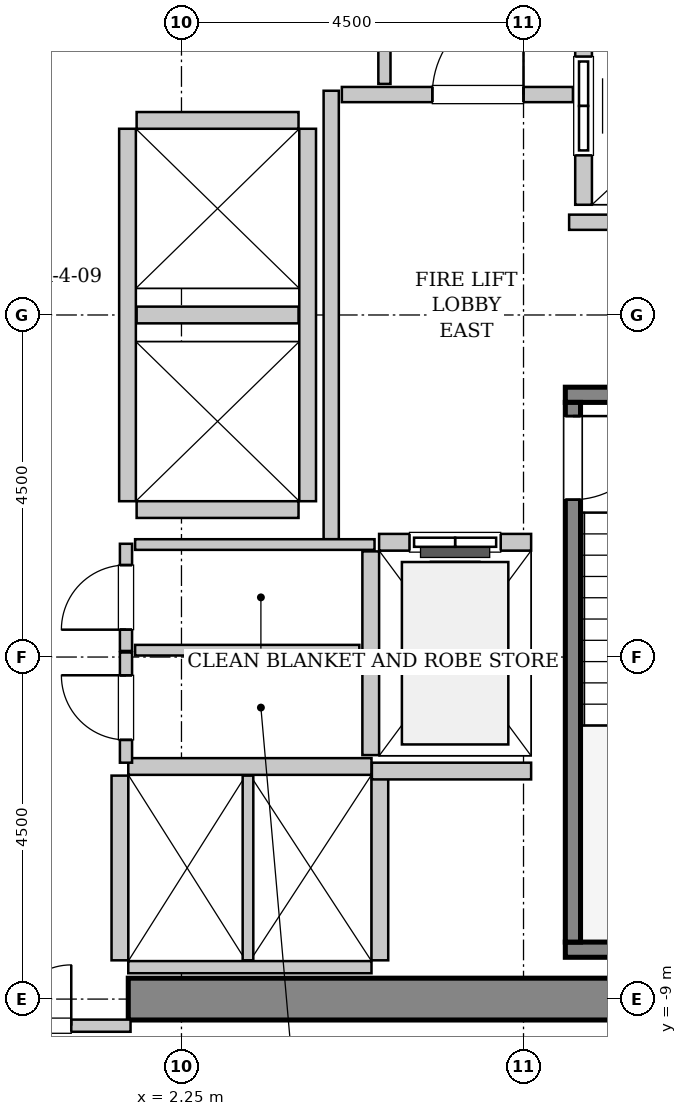
"""IFC4 building model, lengths in metres.
Left out: names, types, materials, properties, quantities, classifications, styles, units other than length and angle.
Written with IfcOpenShell. Run it as: python <this file> out.ifc"""

import sys

from ifc_helpers import new_model, si_unit, direction, frame, frame_2d, origin, place, context, subcontext, project, spatial, rectangle, extrude, source, transform, mapped, element, fill, save


model = new_model("IFC4")
c1 = context("Model", 3, precision=1e-05, world=origin(), true_north=direction((0.0, 1.0)))
c2 = subcontext(c1, "Body", "Model", "MODEL_VIEW")
j1 = project(units=[si_unit("LENGTHUNIT", "METRE"), si_unit("PLANEANGLEUNIT", "RADIAN")], contexts=[c1])
p1 = place(None, origin())
s1 = spatial("IfcSite", under=j1, at=p1, CompositionType="ELEMENT")
p2 = place(p1, origin())
s2 = spatial("IfcBuilding", under=s1, at=p2, CompositionType="ELEMENT")
p3 = place(p2, frame((0.0, 0.0, 125.0)))
s3 = spatial("IfcBuildingStorey", under=s2, at=p3, CompositionType="ELEMENT", Elevation=125.0)
m1 = source(origin(), c2, "Body", "SweptSolid", [
    extrude(rectangle(XDim=9.975, YDim=0.55, at=frame_2d((4.987, 0.0))), origin(), (0.0, 0.0, 1.0), 3.8),
])
p4 = place(p3, frame((1.55, -9.0, 0.0), z_axis=(0.0, 0.0, 1.0), x_axis=(1.0, 0.0, 0.0)))
e1 = element("IfcWall", 1, at=p4, inside=s3, PredefinedType="SHEAR", context=c2, shape_type="MappedRepresentation", body=[
    mapped(m1, transform((0.0, 0.0, 0.0), x_axis=(1.0, 0.0, 0.0), y_axis=(0.0, 1.0, 0.0), z_axis=(0.0, 0.0, 1.0), scale=1.0)),
])
m2 = source(origin(), c2, "Body", "SweptSolid", [
    extrude(rectangle(XDim=3.4, YDim=0.2, at=frame_2d((1.7, 0.0))), origin(), (0.0, 0.0, 1.0), 3.8),
])
p5 = place(p3, frame((7.3, -1.05, 0.0), z_axis=(0.0, 0.0, 1.0), x_axis=(1.0, 0.0, 0.0)))
e2 = element("IfcWall", 2, at=p5, inside=s3, PredefinedType="SOLIDWALL", context=c2, shape_type="MappedRepresentation", body=[
    mapped(m2, transform((0.0, 0.0, 0.0), x_axis=(1.0, 0.0, 0.0), y_axis=(0.0, 1.0, 0.0), z_axis=(0.0, 0.0, 1.0), scale=1.0)),
])
m3 = source(origin(), c2, "Body", "SweptSolid", [
    extrude(rectangle(XDim=3.68, YDim=0.2, at=frame_2d((1.84, 0.0))), origin(), (0.0, 0.0, 1.0), 3.8),
])
p6 = place(p3, frame((7.3, -8.35, 0.0), z_axis=(0.0, 0.0, 1.0), x_axis=(1.0, 0.0, 0.0)))
e3 = element("IfcWall", 3, at=p6, inside=s3, PredefinedType="SOLIDWALL", context=c2, shape_type="MappedRepresentation", body=[
    mapped(m3, transform((0.0, 0.0, 0.0), x_axis=(1.0, 0.0, 0.0), y_axis=(0.0, 1.0, 0.0), z_axis=(0.0, 0.0, 1.0), scale=1.0)),
])
m4 = source(origin(), c2, "Body", "SweptSolid", [
    extrude(rectangle(XDim=7.1, YDim=0.2, at=frame_2d((3.55, 0.0))), origin(), (0.0, 0.0, 1.0), 3.8),
])
p7 = place(p3, frame((7.4, -1.15, 0.0), z_axis=(0.0, 0.0, 1.0), x_axis=(0.0, -1.0, 0.0)))
e4 = element("IfcWall", 4, at=p7, inside=s3, PredefinedType="SOLIDWALL", context=c2, shape_type="MappedRepresentation", body=[
    mapped(m4, transform((0.0, 0.0, 0.0), x_axis=(1.0, 0.0, 0.0), y_axis=(0.0, 1.0, 0.0), z_axis=(0.0, 0.0, 1.0), scale=1.0)),
])
p8 = place(p7, frame((0.18, 0.0, 0.0)))
e5 = element("IfcOpeningElement", 5, at=p8, cuts=e4, PredefinedType="OPENING", context=c2, shape_type="SweptSolid", body=[
    extrude(rectangle(XDim=1.1, YDim=2.15, at=frame_2d((0.55, 1.075))), frame((0.0, 0.11, 0.0), z_axis=(0.0, -1.0, 0.0), x_axis=(1.0, 0.0, 0.0)), (0.0, 0.0, 1.0), 0.22),
])
m5 = source(origin(), c2, "Body", "SweptSolid", [
    extrude(rectangle(XDim=2.0, YDim=0.22, at=frame_2d((1.0, 0.0))), origin(), (0.0, 0.0, 1.0), 3.535),
])
p9 = place(p3, frame((6.85, -2.99, 0.0), z_axis=(0.0, 0.0, 1.0), x_axis=(-1.0, 0.0, 0.0)))
e6 = element("IfcWall", 6, at=p9, inside=s3, PredefinedType="SOLIDWALL", context=c2, shape_type="MappedRepresentation", body=[
    mapped(m5, transform((0.0, 0.0, 0.0), x_axis=(1.0, 0.0, 0.0), y_axis=(0.0, 1.0, 0.0), z_axis=(0.0, 0.0, 1.0), scale=1.0)),
])
p10 = place(p9, frame((0.4, 0.0, 0.0)))
e7 = element("IfcOpeningElement", 7, at=p10, cuts=e6, PredefinedType="OPENING", context=c2, shape_type="SweptSolid", body=[
    extrude(rectangle(XDim=1.2, YDim=2.2, at=frame_2d((0.6, 1.1))), frame((0.0, 0.12, 0.0), z_axis=(0.0, -1.0, 0.0), x_axis=(1.0, 0.0, 0.0)), (0.0, 0.0, 1.0), 0.24),
])
m6 = source(origin(), c2, "Body", "SweptSolid", [
    extrude(rectangle(XDim=2.68, YDim=0.22, at=frame_2d((1.34, 0.0))), origin(), (0.0, 0.0, 1.0), 3.535),
])
p11 = place(p3, frame((4.74, -3.11, 0.0), z_axis=(0.0, 0.0, 1.0), x_axis=(0.0, -1.0, 0.0)))
e8 = element("IfcWall", 8, at=p11, inside=s3, PredefinedType="SOLIDWALL", context=c2, shape_type="MappedRepresentation", body=[
    mapped(m6, transform((0.0, 0.0, 0.0), x_axis=(1.0, 0.0, 0.0), y_axis=(0.0, 1.0, 0.0), z_axis=(0.0, 0.0, 1.0), scale=1.0)),
])
m7 = source(origin(), c2, "Body", "SweptSolid", [
    extrude(rectangle(XDim=5.45, YDim=0.22, at=frame_2d((2.725, 0.0))), origin(), (0.0, 0.0, 1.0), 3.535),
])
p12 = place(p3, frame((7.54, 6.9, 0.0), z_axis=(0.0, 0.0, 1.0), x_axis=(0.0, -1.0, 0.0)))
e9 = element("IfcWall", 9, at=p12, inside=s3, PredefinedType="SOLIDWALL", context=c2, shape_type="MappedRepresentation", body=[
    mapped(m7, transform((0.0, 0.0, 0.0), x_axis=(1.0, 0.0, 0.0), y_axis=(0.0, 1.0, 0.0), z_axis=(0.0, 0.0, 1.0), scale=1.0)),
])
p13 = place(p12, frame((3.5, 0.0, 0.0)))
e10 = element("IfcOpeningElement", 10, at=p13, cuts=e9, PredefinedType="OPENING", context=c2, shape_type="SweptSolid", body=[
    extrude(rectangle(XDim=1.3, YDim=2.3, at=frame_2d((0.65, 1.15))), frame((0.0, 0.12, 0.0), z_axis=(0.0, -1.0, 0.0), x_axis=(1.0, 0.0, 0.0)), (0.0, 0.0, 1.0), 0.24),
])
p14 = place(p12, frame((0.65, 0.0, 0.0)))
e11 = element("IfcOpeningElement", 11, at=p14, cuts=e9, PredefinedType="OPENING", context=c2, shape_type="SweptSolid", body=[
    extrude(rectangle(XDim=1.3, YDim=2.3, at=frame_2d((0.65, 1.15))), frame((0.0, 0.12, 0.0), z_axis=(0.0, -1.0, 0.0), x_axis=(1.0, 0.0, 0.0)), (0.0, 0.0, 1.0), 0.24),
])
m8 = source(origin(), c2, "Body", "SweptSolid", [
    extrude(rectangle(XDim=3.2, YDim=0.22, at=frame_2d((1.6, 0.0))), origin(), (0.0, 0.0, 1.0), 3.535),
])
p15 = place(p3, frame((4.75, -5.94, 0.0), z_axis=(0.0, 0.0, 1.0), x_axis=(-1.0, 0.0, 0.0)))
e12 = element("IfcWall", 12, at=p15, inside=s3, PredefinedType="SOLIDWALL", context=c2, shape_type="MappedRepresentation", body=[
    mapped(m8, transform((0.0, 0.0, 0.0), x_axis=(1.0, 0.0, 0.0), y_axis=(0.0, 1.0, 0.0), z_axis=(0.0, 0.0, 1.0), scale=1.0)),
])
m9 = source(origin(), c2, "Body", "SweptSolid", [
    extrude(rectangle(XDim=3.2, YDim=0.16, at=frame_2d((1.6, 0.0))), origin(), (0.0, 0.0, 1.0), 2.425),
])
p16 = place(p3, frame((1.55, -8.58, 0.0), z_axis=(0.0, 0.0, 1.0), x_axis=(1.0, 0.0, 0.0)))
e13 = element("IfcWall", 13, at=p16, inside=s3, PredefinedType="PARTITIONING", context=c2, shape_type="MappedRepresentation", body=[
    mapped(m9, transform((0.0, 0.0, 0.0), x_axis=(1.0, 0.0, 0.0), y_axis=(0.0, 1.0, 0.0), z_axis=(0.0, 0.0, 1.0), scale=1.0)),
])
m10 = source(origin(), c2, "Body", "SweptSolid", [
    extrude(rectangle(XDim=2.43, YDim=0.22, at=frame_2d((1.215, 0.0))), origin(), (0.0, 0.0, 1.0), 3.535),
])
p17 = place(p3, frame((1.44, -6.06, 0.0), z_axis=(0.0, 0.0, 1.0), x_axis=(0.0, -1.0, 0.0)))
e14 = element("IfcWall", 14, at=p17, inside=s3, PredefinedType="SOLIDWALL", context=c2, shape_type="MappedRepresentation", body=[
    mapped(m10, transform((0.0, 0.0, 0.0), x_axis=(1.0, 0.0, 0.0), y_axis=(0.0, 1.0, 0.0), z_axis=(0.0, 0.0, 1.0), scale=1.0)),
])
m11 = source(origin(), c2, "Body", "SweptSolid", [
    extrude(rectangle(XDim=2.43, YDim=0.14, at=frame_2d((1.215, 0.0))), origin(), (0.0, 0.0, 1.0), 3.535),
])
p18 = place(p3, frame((3.125, -8.49, 0.0), z_axis=(0.0, 0.0, 1.0), x_axis=(0.0, 1.0, 0.0)))
e15 = element("IfcWall", 15, at=p18, inside=s3, PredefinedType="PARTITIONING", context=c2, shape_type="MappedRepresentation", body=[
    mapped(m11, transform((0.0, 0.0, 0.0), x_axis=(1.0, 0.0, 0.0), y_axis=(0.0, 1.0, 0.0), z_axis=(0.0, 0.0, 1.0), scale=1.0)),
])
p19 = place(p3, frame((4.86, -8.49, 0.0), z_axis=(0.0, 0.0, 1.0), x_axis=(0.0, 1.0, 0.0)))
e16 = element("IfcWall", 16, at=p19, inside=s3, PredefinedType="SOLIDWALL", context=c2, shape_type="MappedRepresentation", body=[
    mapped(m10, transform((0.0, 0.0, 0.0), x_axis=(1.0, 0.0, 0.0), y_axis=(0.0, 1.0, 0.0), z_axis=(0.0, 0.0, 1.0), scale=1.0)),
])
m12 = source(origin(), c2, "Body", "SweptSolid", [
    extrude(rectangle(XDim=4.9, YDim=0.22, at=frame_2d((2.45, 0.0))), origin(), (0.0, 0.0, 1.0), 3.535),
])
for number, where, z_axis, x_axis in (
    (17, (1.54, 2.45, 0.0), (0.0, 0.0, 1.0), (0.0, -1.0, 0.0)),
    (18, (3.91, -2.45, 0.0), (0.0, 0.0, 1.0), (0.0, 1.0, 0.0)),
):
    element("IfcWall", number, at=place(p3, frame(where, z_axis=z_axis, x_axis=x_axis)), inside=s3, PredefinedType="SOLIDWALL", context=c2, shape_type="MappedRepresentation", body=[
        mapped(m12, transform((0.0, 0.0, 0.0), x_axis=(1.0, 0.0, 0.0), y_axis=(0.0, 1.0, 0.0), z_axis=(0.0, 0.0, 1.0), scale=1.0)),
    ])
m13 = source(origin(), c2, "Body", "SweptSolid", [
    extrude(rectangle(XDim=2.13, YDim=0.22, at=frame_2d((1.065, 0.0))), origin(), (0.0, 0.0, 1.0), 3.535),
])
for number, where, z_axis, x_axis in (
    (19, (1.66, -2.56, 0.0), (0.0, 0.0, 1.0), (1.0, 0.0, 0.0)),
    (20, (1.66, 0.0, 0.0), (0.0, 0.0, 1.0), (1.0, 0.0, 0.0)),
    (21, (3.79, 2.56, 0.0), (0.0, 0.0, 1.0), (-1.0, 0.0, 0.0)),
):
    element("IfcWall", number, at=place(p3, frame(where, z_axis=z_axis, x_axis=x_axis)), inside=s3, PredefinedType="SOLIDWALL", context=c2, shape_type="MappedRepresentation", body=[
        mapped(m13, transform((0.0, 0.0, 0.0), x_axis=(1.0, 0.0, 0.0), y_axis=(0.0, 1.0, 0.0), z_axis=(0.0, 0.0, 1.0), scale=1.0)),
    ])
m14 = source(origin(), c2, "Body", "SweptSolid", [
    extrude(rectangle(XDim=2.095, YDim=0.22, at=frame_2d((1.048, 0.0))), origin(), (0.0, 0.0, 1.0), 3.535),
])
p20 = place(p3, frame((4.755, -6.0, 0.0), z_axis=(0.0, 0.0, 1.0), x_axis=(1.0, 0.0, 0.0)))
e22 = element("IfcWall", 22, at=p20, inside=s3, PredefinedType="SOLIDWALL", context=c2, shape_type="MappedRepresentation", body=[
    mapped(m14, transform((0.0, 0.0, 0.0), x_axis=(1.0, 0.0, 0.0), y_axis=(0.0, 1.0, 0.0), z_axis=(0.0, 0.0, 1.0), scale=1.0)),
])
m15 = source(origin(), c2, "Body", "SweptSolid", [
    extrude(rectangle(XDim=5.9, YDim=0.2, at=frame_2d((2.95, 0.0))), origin(), (0.0, 0.0, 1.0), 3.535),
])
p21 = place(p3, frame((4.22, -2.95, 0.0), z_axis=(0.0, 0.0, 1.0), x_axis=(0.0, 1.0, 0.0)))
e23 = element("IfcWall", 23, at=p21, inside=s3, PredefinedType="PARTITIONING", context=c2, shape_type="MappedRepresentation", body=[
    mapped(m15, transform((0.0, 0.0, 0.0), x_axis=(1.0, 0.0, 0.0), y_axis=(0.0, 1.0, 0.0), z_axis=(0.0, 0.0, 1.0), scale=1.0)),
])
m16 = source(origin(), c2, "Body", "SweptSolid", [
    extrude(rectangle(XDim=3.04, YDim=0.2, at=frame_2d((1.52, 0.0))), origin(), (0.0, 0.0, 1.0), 3.535),
])
p22 = place(p3, frame((4.36, 2.9, 0.0), z_axis=(0.0, 0.0, 1.0), x_axis=(1.0, 0.0, 0.0)))
e24 = element("IfcWall", 24, at=p22, inside=s3, PredefinedType="PARTITIONING", context=c2, shape_type="MappedRepresentation", body=[
    mapped(m16, transform((0.0, 0.0, 0.0), x_axis=(1.0, 0.0, 0.0), y_axis=(0.0, 1.0, 0.0), z_axis=(0.0, 0.0, 1.0), scale=1.0)),
])
p23 = place(p22, frame((1.19, 0.0, 0.0)))
e25 = element("IfcOpeningElement", 25, at=p23, cuts=e24, PredefinedType="OPENING", context=c2, shape_type="SweptSolid", body=[
    extrude(rectangle(XDim=1.2, YDim=2.15, at=frame_2d((0.6, 1.075))), frame((0.0, 0.11, 0.0), z_axis=(0.0, -1.0, 0.0), x_axis=(1.0, 0.0, 0.0)), (0.0, 0.0, 1.0), 0.22),
])
m17 = source(origin(), c2, "Body", "SweptSolid", [
    extrude(rectangle(XDim=4.11, YDim=0.2, at=frame_2d((2.055, 0.0))), origin(), (0.0, 0.0, 1.0), 3.535),
])
p24 = place(p3, frame((7.35, 1.22, 0.0), z_axis=(0.0, 0.0, 1.0), x_axis=(1.0, 0.0, 0.0)))
e26 = element("IfcWall", 26, at=p24, inside=s3, PredefinedType="PARTITIONING", context=c2, shape_type="MappedRepresentation", body=[
    mapped(m17, transform((0.0, 0.0, 0.0), x_axis=(1.0, 0.0, 0.0), y_axis=(0.0, 1.0, 0.0), z_axis=(0.0, 0.0, 1.0), scale=1.0)),
])
m18 = source(origin(), c2, "Body", "SweptSolid", [
    extrude(rectangle(XDim=3.16, YDim=0.16, at=frame_2d((1.58, 0.0))), origin(), (0.0, 0.0, 1.0), 2.425),
])
p25 = place(p3, frame((-1.58, -9.35, 0.0), z_axis=(0.0, 0.0, 1.0), x_axis=(1.0, 0.0, 0.0)))
e27 = element("IfcWall", 27, at=p25, inside=s3, PredefinedType="PARTITIONING", context=c2, shape_type="MappedRepresentation", body=[
    mapped(m18, transform((0.0, 0.0, 0.0), x_axis=(1.0, 0.0, 0.0), y_axis=(0.0, 1.0, 0.0), z_axis=(0.0, 0.0, 1.0), scale=1.0)),
])
p26 = place(p25, frame((0.78, 0.0, 0.0)))
e28 = element("IfcOpeningElement", 28, at=p26, cuts=e27, PredefinedType="OPENING", context=c2, shape_type="SweptSolid", body=[
    extrude(rectangle(XDim=1.6, YDim=2.3, at=frame_2d((0.8, 1.15))), frame((0.0, 0.09, 0.0), z_axis=(0.0, -1.0, 0.0), x_axis=(1.0, 0.0, 0.0)), (0.0, 0.0, 1.0), 0.18),
])
m19 = source(origin(), c2, "Body", "SweptSolid", [
    extrude(rectangle(XDim=3.015, YDim=0.16, at=frame_2d((1.507, 0.0))), origin(), (0.0, 0.0, 1.0), 3.535),
])
p27 = place(p3, frame((4.92, 3.04, 0.0), z_axis=(0.0, 0.0, 1.0), x_axis=(0.0, 1.0, 0.0)))
e29 = element("IfcWall", 29, at=p27, inside=s3, PredefinedType="PARTITIONING", context=c2, shape_type="MappedRepresentation", body=[
    mapped(m19, transform((0.0, 0.0, 0.0), x_axis=(1.0, 0.0, 0.0), y_axis=(0.0, 1.0, 0.0), z_axis=(0.0, 0.0, 1.0), scale=1.0)),
])
m20 = source(origin(), c2, "Body", "SweptSolid", [
    extrude(rectangle(XDim=1.41, YDim=0.16, at=frame_2d((0.705, 0.0))), origin(), (0.0, 0.0, 1.0), 3.535),
])
p28 = place(p3, frame((1.52, -4.42, 0.0), z_axis=(0.0, 0.0, 1.0), x_axis=(0.0, 1.0, 0.0)))
e30 = element("IfcWall", 30, at=p28, inside=s3, PredefinedType="PARTITIONING", context=c2, shape_type="MappedRepresentation", body=[
    mapped(m20, transform((0.0, 0.0, 0.0), x_axis=(1.0, 0.0, 0.0), y_axis=(0.0, 1.0, 0.0), z_axis=(0.0, 0.0, 1.0), scale=1.0)),
])
p29 = place(p28, frame((0.28, 0.0, 0.0)))
e31 = element("IfcOpeningElement", 31, at=p29, cuts=e30, PredefinedType="OPENING", context=c2, shape_type="SweptSolid", body=[
    extrude(rectangle(XDim=0.85, YDim=2.1, at=frame_2d((0.425, 1.05))), frame((0.0, 0.09, 0.0), z_axis=(0.0, -1.0, 0.0), x_axis=(1.0, 0.0, 0.0)), (0.0, 0.0, 1.0), 0.18),
])
m21 = source(origin(), c2, "Body", "SweptSolid", [
    extrude(rectangle(XDim=3.15, YDim=0.14, at=frame_2d((1.575, 0.0))), origin(), (0.0, 0.0, 1.0), 3.535),
])
p30 = place(p3, frame((1.64, -3.02, 0.0), z_axis=(0.0, 0.0, 1.0), x_axis=(1.0, 0.0, 0.0)))
e32 = element("IfcWall", 32, at=p30, inside=s3, PredefinedType="PARTITIONING", context=c2, shape_type="MappedRepresentation", body=[
    mapped(m21, transform((0.0, 0.0, 0.0), x_axis=(1.0, 0.0, 0.0), y_axis=(0.0, 1.0, 0.0), z_axis=(0.0, 0.0, 1.0), scale=1.0)),
])
m22 = source(origin(), c2, "Body", "SweptSolid", [
    extrude(rectangle(XDim=2.95, YDim=0.14, at=frame_2d((1.475, 0.0))), origin(), (0.0, 0.0, 1.0), 3.535),
])
p31 = place(p3, frame((1.64, -4.41, 0.0), z_axis=(0.0, 0.0, 1.0), x_axis=(1.0, 0.0, 0.0)))
e33 = element("IfcWall", 33, at=p31, inside=s3, PredefinedType="PARTITIONING", context=c2, shape_type="MappedRepresentation", body=[
    mapped(m22, transform((0.0, 0.0, 0.0), x_axis=(1.0, 0.0, 0.0), y_axis=(0.0, 1.0, 0.0), z_axis=(0.0, 0.0, 1.0), scale=1.0)),
])
m23 = source(origin(), c2, "Body", "SweptSolid", [
    extrude(rectangle(XDim=1.45, YDim=0.16, at=frame_2d((0.725, 0.0))), origin(), (0.0, 0.0, 1.0), 3.535),
])
p32 = place(p3, frame((1.52, -5.89, 0.0), z_axis=(0.0, 0.0, 1.0), x_axis=(0.0, 1.0, 0.0)))
e34 = element("IfcWall", 34, at=p32, inside=s3, PredefinedType="PARTITIONING", context=c2, shape_type="MappedRepresentation", body=[
    mapped(m23, transform((0.0, 0.0, 0.0), x_axis=(1.0, 0.0, 0.0), y_axis=(0.0, 1.0, 0.0), z_axis=(0.0, 0.0, 1.0), scale=1.0)),
])
p33 = place(p32, frame((0.3, 0.0, 0.0)))
e35 = element("IfcOpeningElement", 35, at=p33, cuts=e34, PredefinedType="OPENING", context=c2, shape_type="SweptSolid", body=[
    extrude(rectangle(XDim=0.85, YDim=2.1, at=frame_2d((0.425, 1.05))), frame((0.0, 0.09, 0.0), z_axis=(0.0, -1.0, 0.0), x_axis=(1.0, 0.0, 0.0)), (0.0, 0.0, 1.0), 0.18),
])
m24 = source(origin(), c2, "Body", "SweptSolid", [
    extrude(rectangle(XDim=1.1, YDim=2.15, at=frame_2d((0.55, 1.075))), frame((0.0, 0.025, 0.0), z_axis=(0.0, -1.0, 0.0), x_axis=(1.0, 0.0, 0.0)), (0.0, 0.0, 1.0), 0.05),
])
p34 = place(p8, origin())
e36 = element("IfcDoor", 36, at=p34, inside=s3, OperationType="SINGLE_SWING_LEFT", PredefinedType="DOOR", context=c2, shape_type="MappedRepresentation", body=[
    mapped(m24, transform((0.0, 0.0, 0.0), x_axis=(1.0, 0.0, 0.0), y_axis=(0.0, 1.0, 0.0), z_axis=(0.0, 0.0, 1.0), scale=1.0)),
])
fill(e5, e36)
m25 = source(origin(), c2, "Body", "SweptSolid", [
    extrude(rectangle(XDim=1.2, YDim=2.2, at=frame_2d((0.6, 1.1))), frame((0.0, 0.025, 0.0), z_axis=(0.0, -1.0, 0.0), x_axis=(1.0, 0.0, 0.0)), (0.0, 0.0, 1.0), 0.05),
])
p35 = place(p10, origin())
e37 = element("IfcDoor", 37, at=p35, inside=s3, OperationType="SLIDING_TO_LEFT", PredefinedType="DOOR", context=c2, shape_type="MappedRepresentation", body=[
    mapped(m25, transform((0.0, 0.0, 0.0), x_axis=(1.0, 0.0, 0.0), y_axis=(0.0, 1.0, 0.0), z_axis=(0.0, 0.0, 1.0), scale=1.0)),
])
fill(e7, e37)
m26 = source(origin(), c2, "Body", "SweptSolid", [
    extrude(rectangle(XDim=1.3, YDim=2.3, at=frame_2d((0.65, 1.15))), frame((0.0, 0.025, 0.0), z_axis=(0.0, -1.0, 0.0), x_axis=(1.0, 0.0, 0.0)), (0.0, 0.0, 1.0), 0.05),
])
p36 = place(p13, origin())
e38 = element("IfcDoor", 38, at=p36, inside=s3, OperationType="SLIDING_TO_RIGHT", PredefinedType="DOOR", context=c2, shape_type="MappedRepresentation", body=[
    mapped(m26, transform((0.0, 0.0, 0.0), x_axis=(1.0, 0.0, 0.0), y_axis=(0.0, 1.0, 0.0), z_axis=(0.0, 0.0, 1.0), scale=1.0)),
])
fill(e10, e38)
m27 = source(origin(), c2, "Body", "SweptSolid", [
    extrude(rectangle(XDim=1.2, YDim=2.15, at=frame_2d((0.6, 1.075))), frame((0.0, 0.025, 0.0), z_axis=(0.0, -1.0, 0.0), x_axis=(1.0, 0.0, 0.0)), (0.0, 0.0, 1.0), 0.05),
])
p37 = place(p23, origin())
e39 = element("IfcDoor", 39, at=p37, inside=s3, OperationType="SINGLE_SWING_RIGHT", PredefinedType="DOOR", context=c2, shape_type="MappedRepresentation", body=[
    mapped(m27, transform((0.0, 0.0, 0.0), x_axis=(1.0, 0.0, 0.0), y_axis=(0.0, 1.0, 0.0), z_axis=(0.0, 0.0, 1.0), scale=1.0)),
])
fill(e25, e39)
m28 = source(origin(), c2, "Body", "SweptSolid", [
    extrude(rectangle(XDim=1.6, YDim=2.3, at=frame_2d((0.8, 1.15))), frame((0.0, 0.025, 0.0), z_axis=(0.0, -1.0, 0.0), x_axis=(1.0, 0.0, 0.0)), (0.0, 0.0, 1.0), 0.05),
])
p38 = place(p26, origin())
e40 = element("IfcDoor", 40, at=p38, inside=s3, OperationType="DOUBLE_DOOR_SINGLE_SWING", PredefinedType="DOOR", context=c2, shape_type="MappedRepresentation", body=[
    mapped(m28, transform((0.0, 0.0, 0.0), x_axis=(1.0, 0.0, 0.0), y_axis=(0.0, 1.0, 0.0), z_axis=(0.0, 0.0, 1.0), scale=1.0)),
])
fill(e28, e40)
m29 = source(origin(), c2, "Body", "SweptSolid", [
    extrude(rectangle(XDim=0.85, YDim=2.1, at=frame_2d((0.425, 1.05))), frame((0.0, 0.025, 0.0), z_axis=(0.0, -1.0, 0.0), x_axis=(1.0, 0.0, 0.0)), (0.0, 0.0, 1.0), 0.05),
])
p39 = place(p29, origin())
e41 = element("IfcDoor", 41, at=p39, inside=s3, OperationType="SINGLE_SWING_LEFT", PredefinedType="DOOR", context=c2, shape_type="MappedRepresentation", body=[
    mapped(m29, transform((0.0, 0.0, 0.0), x_axis=(1.0, 0.0, 0.0), y_axis=(0.0, 1.0, 0.0), z_axis=(0.0, 0.0, 1.0), scale=1.0)),
])
fill(e31, e41)
p40 = place(p33, origin())
e42 = element("IfcDoor", 42, at=p40, inside=s3, OperationType="SINGLE_SWING_RIGHT", PredefinedType="DOOR", context=c2, shape_type="MappedRepresentation", body=[
    mapped(m29, transform((0.0, 0.0, 0.0), x_axis=(1.0, 0.0, 0.0), y_axis=(0.0, 1.0, 0.0), z_axis=(0.0, 0.0, 1.0), scale=1.0)),
])
fill(e35, e42)
save(model, sys.argv[1])
